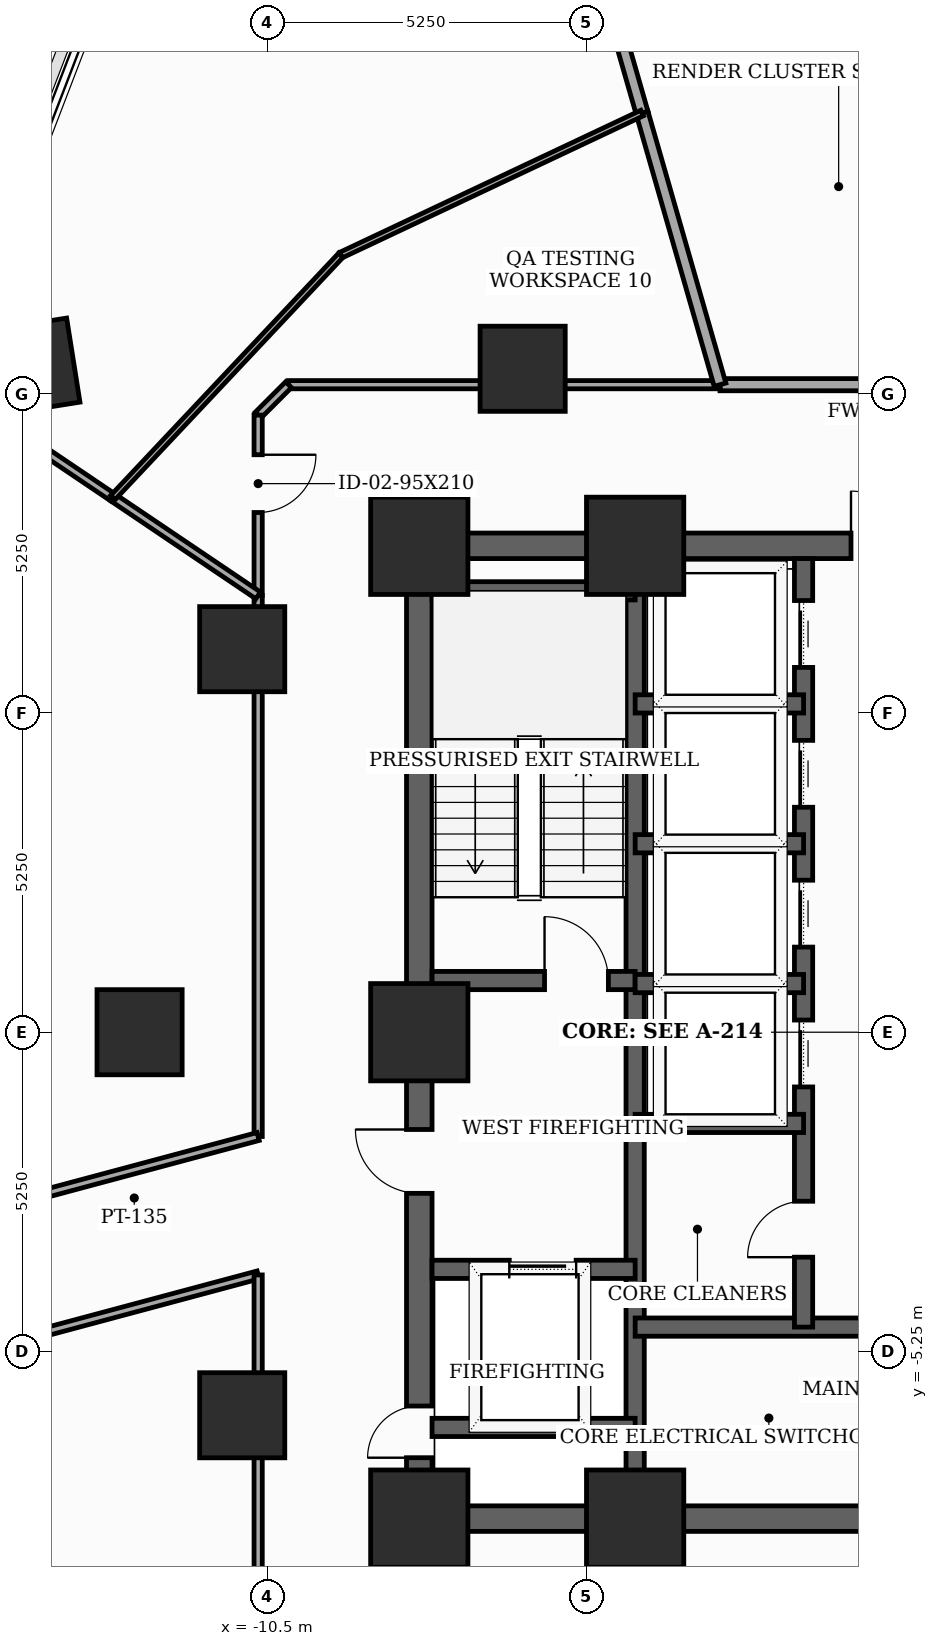
"""IFC4 building model, lengths in metres.
Left out: names, types, materials, properties, quantities, classifications, styles, units other than length and angle.
Written with IfcOpenShell. Run it as: python <this file> out.ifc"""

import sys

from ifc_helpers import new_model, si_unit, direction, frame, frame_2d, origin, origin_2d, place, context, subcontext, project, spatial, rectangle, extrude, element, fill, save


model = new_model("IFC4")
c1 = context("Model", 3, precision=1e-05, world=origin(), true_north=direction((0.0, 1.0)))
c2 = subcontext(c1, "Body", "Model", "MODEL_VIEW")
j1 = project(units=[si_unit("LENGTHUNIT", "METRE"), si_unit("PLANEANGLEUNIT", "RADIAN")], contexts=[c1])
p1 = place(None, origin())
s1 = spatial("IfcSite", under=j1, at=p1, CompositionType="ELEMENT")
p2 = place(p1, origin())
s2 = spatial("IfcBuilding", under=s1, at=p2, CompositionType="ELEMENT")
p3 = place(p2, frame((0.0, 0.0, 55.6)))
s3 = spatial("IfcBuildingStorey", under=s2, at=p3, CompositionType="ELEMENT", Elevation=55.6)
for number, where, z_axis, x_axis in (
    (1, (-8.0, -8.0, 0.0), (0.0, 0.0, 1.0), (1.0, 0.0, 0.0)),
    (2, (-4.45, -8.0, 0.0), (0.0, 0.0, 1.0), (1.0, 0.0, 0.0)),
    (3, (-4.45, 8.0, 0.0), (0.0, 0.0, 1.0), (1.0, 0.0, 0.0)),
    (4, (-8.0, 8.0, 0.0), (0.0, 0.0, 1.0), (1.0, 0.0, 0.0)),
    (5, (-8.0, 0.0, 0.0), (0.0, 0.0, 1.0), (1.0, 0.0, 0.0)),
):
    element("IfcColumn", number, at=place(p3, frame(where, z_axis=z_axis, x_axis=x_axis)), inside=s3, PredefinedType="COLUMN", context=c2, shape_type="SweptSolid", body=[
        extrude(rectangle(XDim=1.6, YDim=1.6, at=origin_2d()), origin(), (0.0, 0.0, 1.0), 3.7),
    ])
for number, where, z_axis, x_axis in (
    (6, (-6.3, 10.912, 0.0), (0.0, 0.0, 1.0), (1.0, 0.0, 0.0)),
    (7, (-10.912, 6.3, 0.0), (0.0, 0.0, 1.0), (1.0, 0.0, 0.0)),
    (8, (-12.6, 0.0, 0.0), (0.0, 0.0, 1.0), (1.0, 0.0, 0.0)),
    (9, (-10.912, -6.3, 0.0), (0.0, 0.0, 1.0), (1.0, 0.0, 0.0)),
    (10, (-14.381, 10.945, 0.0), (0.0, 0.0, 1.0), (0.988, 0.156, 0.0)),
):
    element("IfcColumn", number, at=place(p3, frame(where, z_axis=z_axis, x_axis=x_axis)), inside=s3, PredefinedType="COLUMN", context=c2, shape_type="SweptSolid", body=[
        extrude(rectangle(XDim=1.4, YDim=1.4, at=origin_2d()), origin(), (0.0, 0.0, 1.0), 3.7),
    ])
p4 = place(p3, frame((-8.0, -8.0, 0.0), z_axis=(0.0, 0.0, 1.0), x_axis=(0.0, 1.0, 0.0)))
e11 = element("IfcWall", 11, at=p4, inside=s3, PredefinedType="SHEAR", context=c2, shape_type="SweptSolid", body=[
    extrude(rectangle(XDim=16.0, YDim=0.42, at=frame_2d((8.0, 0.0))), origin(), (0.0, 0.0, 1.0), 3.5),
])
p5 = place(p4, frame((1.002, 0.0, 0.0)))
e12 = element("IfcOpeningElement", 12, at=p5, cuts=e11, PredefinedType="OPENING", context=c2, shape_type="SweptSolid", body=[
    extrude(rectangle(XDim=0.85, YDim=2.02, at=frame_2d((0.425, 1.01))), frame((0.0, 0.22, 0.0), z_axis=(0.0, -1.0, 0.0), x_axis=(1.0, 0.0, 0.0)), (0.0, 0.0, 1.0), 0.44),
])
p6 = place(p4, frame((5.35, 0.0, 0.0)))
e13 = element("IfcOpeningElement", 13, at=p6, cuts=e11, PredefinedType="OPENING", context=c2, shape_type="SweptSolid", body=[
    extrude(rectangle(XDim=1.05, YDim=2.15, at=frame_2d((0.525, 1.075))), frame((0.0, 0.22, 0.0), z_axis=(0.0, -1.0, 0.0), x_axis=(1.0, 0.0, 0.0)), (0.0, 0.0, 1.0), 0.44),
])
p7 = place(p3, frame((-8.0, -8.0, 0.0), z_axis=(0.0, 0.0, 1.0), x_axis=(1.0, 0.0, 0.0)))
e14 = element("IfcWall", 14, at=p7, inside=s3, PredefinedType="SHEAR", context=c2, shape_type="SweptSolid", body=[
    extrude(rectangle(XDim=16.0, YDim=0.42, at=frame_2d((8.0, 0.0))), origin(), (0.0, 0.0, 1.0), 3.5),
])
p8 = place(p7, frame((7.52, 0.0, 0.0)))
e15 = element("IfcOpeningElement", 15, at=p8, cuts=e14, PredefinedType="OPENING", context=c2, shape_type="SweptSolid", body=[
    extrude(rectangle(XDim=0.95, YDim=2.1, at=frame_2d((0.475, 1.05))), frame((0.0, 0.22, 0.0), z_axis=(0.0, -1.0, 0.0), x_axis=(1.0, 0.0, 0.0)), (0.0, 0.0, 1.0), 0.44),
])
p9 = place(p3, frame((-8.0, 8.0, 0.0), z_axis=(0.0, 0.0, 1.0), x_axis=(1.0, 0.0, 0.0)))
e16 = element("IfcWall", 16, at=p9, inside=s3, PredefinedType="SHEAR", context=c2, shape_type="SweptSolid", body=[
    extrude(rectangle(XDim=16.0, YDim=0.42, at=frame_2d((8.0, 0.0))), origin(), (0.0, 0.0, 1.0), 3.5),
])
p10 = place(p9, frame((7.1, 0.0, 0.0)))
e17 = element("IfcOpeningElement", 17, at=p10, cuts=e16, PredefinedType="OPENING", context=c2, shape_type="SweptSolid", body=[
    extrude(rectangle(XDim=1.8, YDim=2.15, at=frame_2d((0.9, 1.075))), frame((0.0, 0.22, 0.0), z_axis=(0.0, -1.0, 0.0), x_axis=(1.0, 0.0, 0.0)), (0.0, 0.0, 1.0), 0.44),
])
p11 = place(p3, frame((-4.45, -7.79, 0.0), z_axis=(0.0, 0.0, 1.0), x_axis=(0.0, 1.0, 0.0)))
e18 = element("IfcWall", 18, at=p11, inside=s3, PredefinedType="SHEAR", context=c2, shape_type="SweptSolid", body=[
    extrude(rectangle(XDim=15.58, YDim=0.3, at=frame_2d((7.79, 0.0))), origin(), (0.0, 0.0, 1.0), 3.5),
])
p12 = place(p3, frame((-7.79, 0.85, 0.0), z_axis=(0.0, 0.0, 1.0), x_axis=(1.0, 0.0, 0.0)))
e19 = element("IfcWall", 19, at=p12, inside=s3, PredefinedType="SHEAR", context=c2, shape_type="SweptSolid", body=[
    extrude(rectangle(XDim=3.34, YDim=0.3, at=frame_2d((1.67, 0.0))), origin(), (0.0, 0.0, 1.0), 3.5),
])
p13 = place(p12, frame((1.85, 0.0, 0.0)))
e20 = element("IfcOpeningElement", 20, at=p13, cuts=e19, PredefinedType="OPENING", context=c2, shape_type="SweptSolid", body=[
    extrude(rectangle(XDim=1.05, YDim=2.15, at=frame_2d((0.525, 1.075))), frame((0.0, 0.16, 0.0), z_axis=(0.0, -1.0, 0.0), x_axis=(1.0, 0.0, 0.0)), (0.0, 0.0, 1.0), 0.32),
])
p14 = place(p3, frame((-7.79, 7.26, 0.0), z_axis=(0.0, 0.0, 1.0), x_axis=(1.0, 0.0, 0.0)))
e21 = element("IfcWall", 21, at=p14, inside=s3, PredefinedType="SHEAR", context=c2, shape_type="SweptSolid", body=[
    extrude(rectangle(XDim=3.34, YDim=0.3, at=frame_2d((1.67, 0.0))), origin(), (0.0, 0.0, 1.0), 3.5),
])
p15 = place(p3, frame((-7.79, -3.9, 0.0), z_axis=(0.0, 0.0, 1.0), x_axis=(1.0, 0.0, 0.0)))
e22 = element("IfcWall", 22, at=p15, inside=s3, PredefinedType="SHEAR", context=c2, shape_type="SweptSolid", body=[
    extrude(rectangle(XDim=3.34, YDim=0.3, at=frame_2d((1.67, 0.0))), origin(), (0.0, 0.0, 1.0), 3.5),
])
p16 = place(p15, frame((1.27, 0.0, 0.0)))
e23 = element("IfcOpeningElement", 23, at=p16, cuts=e22, PredefinedType="OPENING", context=c2, shape_type="SweptSolid", body=[
    extrude(rectangle(XDim=1.1, YDim=2.1, at=frame_2d((0.55, 1.05))), frame((0.0, 0.16, 0.0), z_axis=(0.0, -1.0, 0.0), x_axis=(1.0, 0.0, 0.0)), (0.0, 0.0, 1.0), 0.32),
])
p17 = place(p3, frame((-7.79, -6.5, 0.0), z_axis=(0.0, 0.0, 1.0), x_axis=(1.0, 0.0, 0.0)))
e24 = element("IfcWall", 24, at=p17, inside=s3, PredefinedType="SHEAR", context=c2, shape_type="SweptSolid", body=[
    extrude(rectangle(XDim=3.34, YDim=0.3, at=frame_2d((1.67, 0.0))), origin(), (0.0, 0.0, 1.0), 3.5),
])
p18 = place(p3, frame((-4.45, -4.85, 0.0), z_axis=(0.0, 0.0, 1.0), x_axis=(1.0, 0.0, 0.0)))
e25 = element("IfcWall", 25, at=p18, inside=s3, PredefinedType="SHEAR", context=c2, shape_type="SweptSolid", body=[
    extrude(rectangle(XDim=8.9, YDim=0.3, at=frame_2d((4.45, 0.0))), origin(), (0.0, 0.0, 1.0), 3.5),
])
p19 = place(p3, frame((-1.68, -4.85, 0.0), z_axis=(0.0, 0.0, 1.0), x_axis=(0.0, 1.0, 0.0)))
e26 = element("IfcWall", 26, at=p19, inside=s3, PredefinedType="SHEAR", context=c2, shape_type="SweptSolid", body=[
    extrude(rectangle(XDim=12.64, YDim=0.3, at=frame_2d((6.32, 0.0))), origin(), (0.0, 0.0, 1.0), 3.5),
])
p20 = place(p19, frame((3.95, 0.0, 0.0)))
e27 = element("IfcOpeningElement", 27, at=p20, cuts=e26, PredefinedType="OPENING", context=c2, shape_type="SweptSolid", body=[
    extrude(rectangle(XDim=1.1, YDim=2.1, at=frame_2d((0.55, 1.05))), frame((0.0, 0.16, 0.0), z_axis=(0.0, -1.0, 0.0), x_axis=(1.0, 0.0, 0.0)), (0.0, 0.0, 1.0), 0.32),
])
p21 = place(p19, frame((6.25, 0.0, 0.0)))
e28 = element("IfcOpeningElement", 28, at=p21, cuts=e26, PredefinedType="OPENING", context=c2, shape_type="SweptSolid", body=[
    extrude(rectangle(XDim=1.1, YDim=2.1, at=frame_2d((0.55, 1.05))), frame((0.0, 0.16, 0.0), z_axis=(0.0, -1.0, 0.0), x_axis=(1.0, 0.0, 0.0)), (0.0, 0.0, 1.0), 0.32),
])
p22 = place(p19, frame((8.55, 0.0, 0.0)))
e29 = element("IfcOpeningElement", 29, at=p22, cuts=e26, PredefinedType="OPENING", context=c2, shape_type="SweptSolid", body=[
    extrude(rectangle(XDim=1.1, YDim=2.1, at=frame_2d((0.55, 1.05))), frame((0.0, 0.16, 0.0), z_axis=(0.0, -1.0, 0.0), x_axis=(1.0, 0.0, 0.0)), (0.0, 0.0, 1.0), 0.32),
])
p23 = place(p19, frame((10.85, 0.0, 0.0)))
e30 = element("IfcOpeningElement", 30, at=p23, cuts=e26, PredefinedType="OPENING", context=c2, shape_type="SweptSolid", body=[
    extrude(rectangle(XDim=1.1, YDim=2.1, at=frame_2d((0.55, 1.05))), frame((0.0, 0.16, 0.0), z_axis=(0.0, -1.0, 0.0), x_axis=(1.0, 0.0, 0.0)), (0.0, 0.0, 1.0), 0.32),
])
p24 = place(p19, frame((1.15, 0.0, 0.0)))
e31 = element("IfcOpeningElement", 31, at=p24, cuts=e26, PredefinedType="OPENING", context=c2, shape_type="SweptSolid", body=[
    extrude(rectangle(XDim=0.92, YDim=2.1, at=frame_2d((0.46, 1.05))), frame((0.0, 0.16, 0.0), z_axis=(0.0, -1.0, 0.0), x_axis=(1.0, 0.0, 0.0)), (0.0, 0.0, 1.0), 0.32),
])
for number, where, z_axis, x_axis in (
    (32, (-4.45, -1.5, 0.0), (0.0, 0.0, 1.0), (1.0, 0.0, 0.0)),
    (33, (-4.45, 0.8, 0.0), (0.0, 0.0, 1.0), (1.0, 0.0, 0.0)),
    (34, (-4.45, 3.1, 0.0), (0.0, 0.0, 1.0), (1.0, 0.0, 0.0)),
    (35, (-4.45, 5.4, 0.0), (0.0, 0.0, 1.0), (1.0, 0.0, 0.0)),
):
    element("IfcWall", number, at=place(p3, frame(where, z_axis=z_axis, x_axis=x_axis)), inside=s3, PredefinedType="SHEAR", context=c2, shape_type="SweptSolid", body=[
        extrude(rectangle(XDim=2.77, YDim=0.3, at=frame_2d((1.385, 0.0))), origin(), (0.0, 0.0, 1.0), 3.5),
    ])
p25 = place(p3, frame((-10.65, 7.184, 0.0), z_axis=(0.0, 0.0, 1.0), x_axis=(0.0, -1.0, 0.0)))
e36 = element("IfcWall", 36, at=p25, inside=s3, PredefinedType="PARTITIONING", context=c2, shape_type="SweptSolid", body=[
    extrude(rectangle(XDim=8.899, YDim=0.135, at=frame_2d((4.45, 0.0))), origin(), (0.0, 0.0, 1.0), 2.785),
])
p26 = place(p3, frame((-10.65, -1.715, 0.0), z_axis=(0.0, 0.0, 1.0), x_axis=(-0.965937452198, -0.258775652721, 0.0)))
e37 = element("IfcWall", 37, at=p26, inside=s3, PredefinedType="PARTITIONING", context=c2, shape_type="SweptSolid", body=[
    extrude(rectangle(XDim=9.869, YDim=0.135, at=frame_2d((4.935, 0.0))), origin(), (0.0, 0.0, 1.0), 2.785),
])
p27 = place(p26, frame((4.46, 0.0, 0.0)))
e38 = element("IfcOpeningElement", 38, at=p27, cuts=e37, PredefinedType="OPENING", context=c2, shape_type="SweptSolid", body=[
    extrude(rectangle(XDim=0.95, YDim=2.1, at=frame_2d((0.475, 1.05))), frame((0.0, 0.077, 0.0), z_axis=(0.0, -1.0, 0.0), x_axis=(1.0, 0.0, 0.0)), (0.0, 0.0, 1.0), 0.155),
])
p28 = place(p3, frame((-19.613, -6.394, 0.0), z_axis=(0.0, 0.0, 1.0), x_axis=(0.96591410887, 0.258862771148, 0.0)))
e39 = element("IfcWall", 39, at=p28, inside=s3, PredefinedType="PARTITIONING", context=c2, shape_type="SweptSolid", body=[
    extrude(rectangle(XDim=9.28, YDim=0.135, at=frame_2d((4.64, 0.0))), origin(), (0.0, 0.0, 1.0), 2.785),
])
p29 = place(p3, frame((-10.65, -3.992, 0.0), z_axis=(0.0, 0.0, 1.0), x_axis=(0.0, -1.0, 0.0)))
e40 = element("IfcWall", 40, at=p29, inside=s3, PredefinedType="PARTITIONING", context=c2, shape_type="SweptSolid", body=[
    extrude(rectangle(XDim=6.158, YDim=0.135, at=frame_2d((3.079, 0.0))), origin(), (0.0, 0.0, 1.0), 2.785),
])
p30 = place(p3, frame((1.715, 10.65, 0.0), z_axis=(0.0, 0.0, 1.0), x_axis=(-1.0, 0.0, 0.0)))
e41 = element("IfcWall", 41, at=p30, inside=s3, PredefinedType="SOLIDWALL", context=c2, shape_type="SweptSolid", body=[
    extrude(rectangle(XDim=4.769, YDim=0.2, at=frame_2d((2.385, 0.0))), origin(), (0.0, 0.0, 1.0), 2.785),
])
p31 = place(p3, frame((-3.054, 10.65, 0.0), z_axis=(0.0, 0.0, 1.0), x_axis=(-1.0, 0.0, 0.0)))
e42 = element("IfcWall", 42, at=p31, inside=s3, PredefinedType="PARTITIONING", context=c2, shape_type="SweptSolid", body=[
    extrude(rectangle(XDim=7.096, YDim=0.135, at=frame_2d((3.548, 0.0))), origin(), (0.0, 0.0, 1.0), 2.785),
])
p32 = place(p3, frame((-10.15, 10.65, 0.0), z_axis=(0.0, 0.0, 1.0), x_axis=(-0.707106781187, -0.707106781187, 0.0)))
e43 = element("IfcWall", 43, at=p32, inside=s3, PredefinedType="PARTITIONING", context=c2, shape_type="SweptSolid", body=[
    extrude(rectangle(XDim=0.707, YDim=0.135, at=frame_2d((0.354, 0.0))), origin(), (0.0, 0.0, 1.0), 3.5),
])
p33 = place(p3, frame((-10.65, 10.15, 0.0), z_axis=(0.0, 0.0, 1.0), x_axis=(0.0, -1.0, 0.0)))
e44 = element("IfcWall", 44, at=p33, inside=s3, PredefinedType="PARTITIONING", context=c2, shape_type="SweptSolid", body=[
    extrude(rectangle(XDim=2.966, YDim=0.135, at=frame_2d((1.483, 0.0))), origin(), (0.0, 0.0, 1.0), 3.5),
])
p34 = place(p33, frame((0.652, 0.0, 0.0)))
e45 = element("IfcOpeningElement", 45, at=p34, cuts=e44, PredefinedType="OPENING", context=c2, shape_type="SweptSolid", body=[
    extrude(rectangle(XDim=0.95, YDim=2.1, at=frame_2d((0.475, 1.05))), frame((0.0, 0.077, 0.0), z_axis=(0.0, -1.0, 0.0), x_axis=(1.0, 0.0, 0.0)), (0.0, 0.0, 1.0), 0.155),
])
p35 = place(p3, frame((-13.038, 8.795, 0.0), z_axis=(0.0, 0.0, 1.0), x_axis=(-0.829071326064, 0.559142858578, 0.0)))
e46 = element("IfcWall", 46, at=p35, inside=s3, PredefinedType="PARTITIONING", context=c2, shape_type="SweptSolid", body=[
    extrude(rectangle(XDim=3.279, YDim=0.135, at=frame_2d((1.639, 0.0))), origin(), (0.0, 0.0, 1.0), 2.785),
])
p36 = place(p3, frame((-10.65, 7.184, 0.0), z_axis=(0.0, 0.0, 1.0), x_axis=(-0.829039234985, 0.559190438809, 0.0)))
e47 = element("IfcWall", 47, at=p36, inside=s3, PredefinedType="PARTITIONING", context=c2, shape_type="SweptSolid", body=[
    extrude(rectangle(XDim=2.881, YDim=0.135, at=frame_2d((1.44, 0.0))), origin(), (0.0, 0.0, 1.0), 2.785),
])
p37 = place(p3, frame((-4.689, 16.351, 0.0), z_axis=(0.0, 0.0, 1.0), x_axis=(0.275927308223, -0.961178506094, 0.0)))
e48 = element("IfcWall", 48, at=p37, inside=s3, PredefinedType="SOLIDWALL", context=c2, shape_type="SweptSolid", body=[
    extrude(rectangle(XDim=1.283, YDim=0.2, at=frame_2d((0.642, 0.0))), origin(), (0.0, 0.0, 1.0), 3.5),
])
p38 = place(p3, frame((-4.335, 15.118, 0.0), z_axis=(0.0, 0.0, 1.0), x_axis=(0.275602055924, -0.961271817318, 0.0)))
e49 = element("IfcWall", 49, at=p38, inside=s3, PredefinedType="SOLIDWALL", context=c2, shape_type="SweptSolid", body=[
    extrude(rectangle(XDim=4.648, YDim=0.2, at=frame_2d((2.324, 0.0))), origin(), (0.0, 0.0, 1.0), 2.785),
])
p39 = place(p3, frame((-13.038, 8.795, 0.0), z_axis=(0.0, 0.0, 1.0), x_axis=(0.685214439986, 0.728341383716, 0.0)))
e50 = element("IfcWall", 50, at=p39, inside=s3, PredefinedType="MOVABLE", context=c2, shape_type="SweptSolid", body=[
    extrude(rectangle(XDim=5.474, YDim=0.1, at=frame_2d((2.737, 0.0))), origin(), (0.0, 0.0, 1.0), 2.785),
])
p40 = place(p3, frame((-9.287, 12.782, 0.0), z_axis=(0.0, 0.0, 1.0), x_axis=(0.904430294069, 0.4266214284, 0.0)))
e51 = element("IfcWall", 51, at=p40, inside=s3, PredefinedType="MOVABLE", context=c2, shape_type="SweptSolid", body=[
    extrude(rectangle(XDim=5.475, YDim=0.1, at=frame_2d((2.738, 0.0))), origin(), (0.0, 0.0, 1.0), 2.785),
])
p41 = place(p5, origin())
e52 = element("IfcDoor", 52, at=p41, inside=s3, OperationType="SINGLE_SWING_LEFT", PredefinedType="TRAPDOOR", context=c2, shape_type="SweptSolid", body=[
    extrude(rectangle(XDim=0.85, YDim=2.02, at=frame_2d((0.425, 1.01))), frame((0.0, 0.025, 0.0), z_axis=(0.0, -1.0, 0.0), x_axis=(1.0, 0.0, 0.0)), (0.0, 0.0, 1.0), 0.05),
])
fill(e12, e52)
p42 = place(p6, origin())
e53 = element("IfcDoor", 53, at=p42, inside=s3, OperationType="SINGLE_SWING_RIGHT", PredefinedType="DOOR", context=c2, shape_type="SweptSolid", body=[
    extrude(rectangle(XDim=1.05, YDim=2.15, at=frame_2d((0.525, 1.075))), frame((0.0, 0.025, 0.0), z_axis=(0.0, -1.0, 0.0), x_axis=(1.0, 0.0, 0.0)), (0.0, 0.0, 1.0), 0.05),
])
fill(e13, e53)
p43 = place(p10, origin())
e54 = element("IfcDoor", 54, at=p43, inside=s3, OperationType="DOUBLE_DOOR_SINGLE_SWING", PredefinedType="DOOR", context=c2, shape_type="SweptSolid", body=[
    extrude(rectangle(XDim=1.8, YDim=2.15, at=frame_2d((0.9, 1.075))), frame((0.0, 0.025, 0.0), z_axis=(0.0, -1.0, 0.0), x_axis=(1.0, 0.0, 0.0)), (0.0, 0.0, 1.0), 0.05),
])
fill(e17, e54)
p44 = place(p13, origin())
e55 = element("IfcDoor", 55, at=p44, inside=s3, OperationType="SINGLE_SWING_LEFT", PredefinedType="DOOR", context=c2, shape_type="SweptSolid", body=[
    extrude(rectangle(XDim=1.05, YDim=2.15, at=frame_2d((0.525, 1.075))), frame((0.0, 0.025, 0.0), z_axis=(0.0, -1.0, 0.0), x_axis=(1.0, 0.0, 0.0)), (0.0, 0.0, 1.0), 0.05),
])
fill(e20, e55)
p45 = place(p16, origin())
e56 = element("IfcDoor", 56, at=p45, inside=s3, OperationType="SLIDING_TO_LEFT", PredefinedType="DOOR", context=c2, shape_type="SweptSolid", body=[
    extrude(rectangle(XDim=1.1, YDim=2.1, at=frame_2d((0.55, 1.05))), frame((0.0, 0.025, 0.0), z_axis=(0.0, -1.0, 0.0), x_axis=(1.0, 0.0, 0.0)), (0.0, 0.0, 1.0), 0.05),
])
fill(e23, e56)
p46 = place(p20, origin())
e57 = element("IfcDoor", 57, at=p46, inside=s3, OperationType="SLIDING_TO_LEFT", PredefinedType="DOOR", context=c2, shape_type="SweptSolid", body=[
    extrude(rectangle(XDim=1.1, YDim=2.1, at=frame_2d((0.55, 1.05))), frame((0.0, 0.025, 0.0), z_axis=(0.0, -1.0, 0.0), x_axis=(1.0, 0.0, 0.0)), (0.0, 0.0, 1.0), 0.05),
])
fill(e27, e57)
p47 = place(p21, origin())
e58 = element("IfcDoor", 58, at=p47, inside=s3, OperationType="SLIDING_TO_LEFT", PredefinedType="DOOR", context=c2, shape_type="SweptSolid", body=[
    extrude(rectangle(XDim=1.1, YDim=2.1, at=frame_2d((0.55, 1.05))), frame((0.0, 0.025, 0.0), z_axis=(0.0, -1.0, 0.0), x_axis=(1.0, 0.0, 0.0)), (0.0, 0.0, 1.0), 0.05),
])
fill(e28, e58)
p48 = place(p22, origin())
e59 = element("IfcDoor", 59, at=p48, inside=s3, OperationType="SLIDING_TO_LEFT", PredefinedType="DOOR", context=c2, shape_type="SweptSolid", body=[
    extrude(rectangle(XDim=1.1, YDim=2.1, at=frame_2d((0.55, 1.05))), frame((0.0, 0.025, 0.0), z_axis=(0.0, -1.0, 0.0), x_axis=(1.0, 0.0, 0.0)), (0.0, 0.0, 1.0), 0.05),
])
fill(e29, e59)
p49 = place(p23, origin())
e60 = element("IfcDoor", 60, at=p49, inside=s3, OperationType="SLIDING_TO_LEFT", PredefinedType="DOOR", context=c2, shape_type="SweptSolid", body=[
    extrude(rectangle(XDim=1.1, YDim=2.1, at=frame_2d((0.55, 1.05))), frame((0.0, 0.025, 0.0), z_axis=(0.0, -1.0, 0.0), x_axis=(1.0, 0.0, 0.0)), (0.0, 0.0, 1.0), 0.05),
])
fill(e30, e60)
p50 = place(p24, origin())
e61 = element("IfcDoor", 61, at=p50, inside=s3, OperationType="SINGLE_SWING_LEFT", PredefinedType="DOOR", context=c2, shape_type="SweptSolid", body=[
    extrude(rectangle(XDim=0.92, YDim=2.1, at=frame_2d((0.46, 1.05))), frame((0.0, 0.025, 0.0), z_axis=(0.0, -1.0, 0.0), x_axis=(1.0, 0.0, 0.0)), (0.0, 0.0, 1.0), 0.05),
])
fill(e31, e61)
p51 = place(p34, origin())
e62 = element("IfcDoor", 62, at=p51, inside=s3, OperationType="SINGLE_SWING_LEFT", PredefinedType="DOOR", context=c2, shape_type="SweptSolid", body=[
    extrude(rectangle(XDim=0.95, YDim=2.1, at=frame_2d((0.475, 1.05))), frame((0.0, 0.025, 0.0), z_axis=(0.0, -1.0, 0.0), x_axis=(1.0, 0.0, 0.0)), (0.0, 0.0, 1.0), 0.05),
])
fill(e45, e62)
save(model, sys.argv[1])
